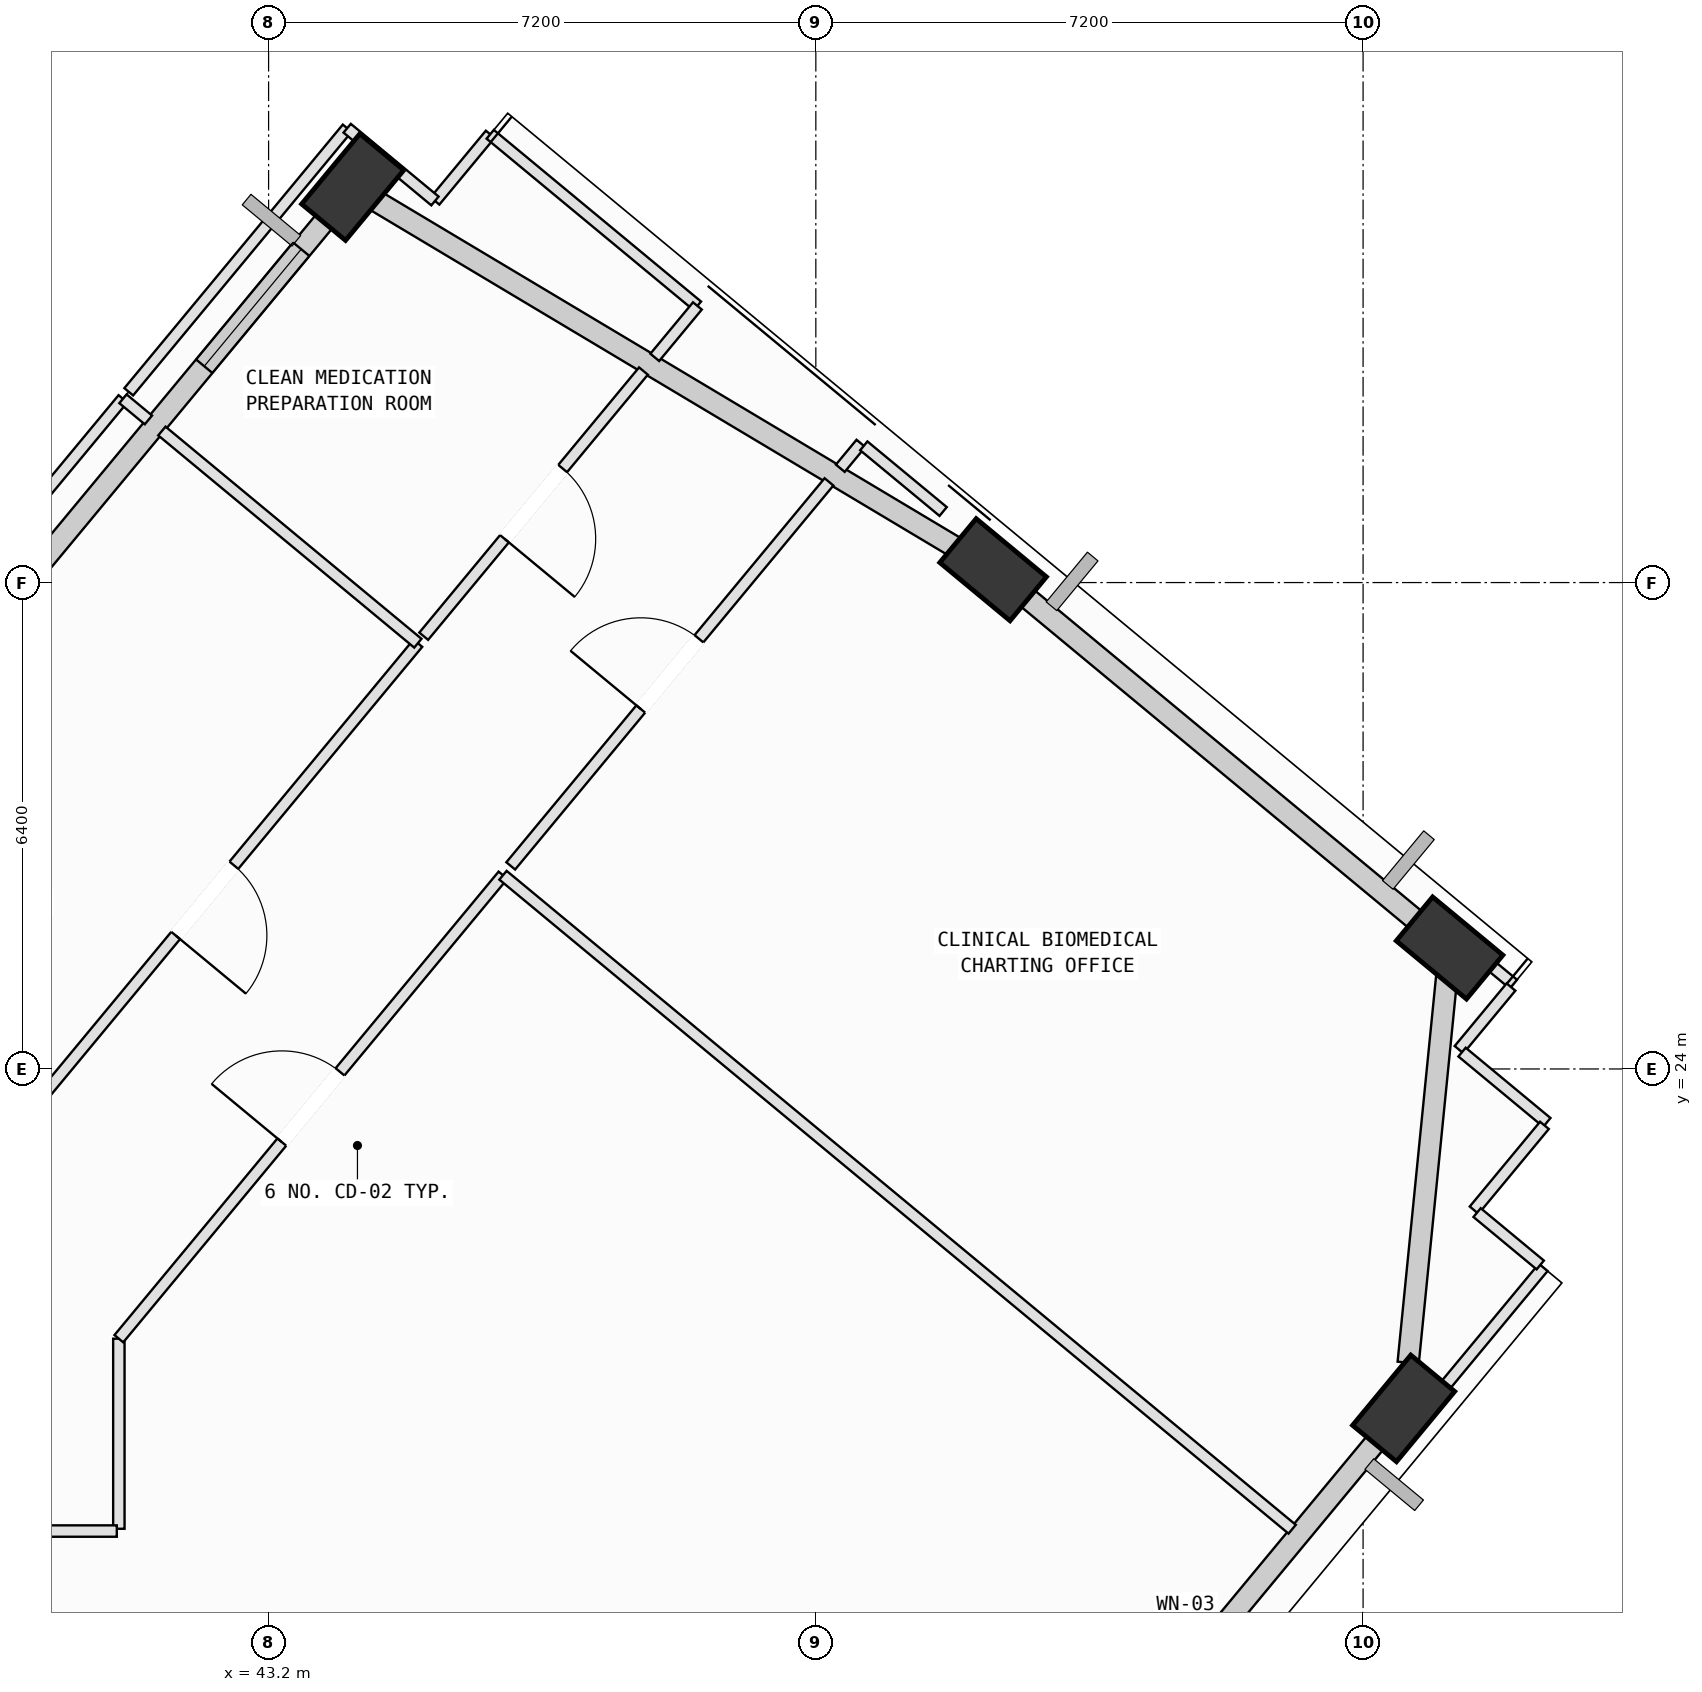
"""IFC4 building model, lengths in metres.
Left out: names, types, materials, properties, quantities, classifications, styles, units other than length and angle.
Written with IfcOpenShell. Run it as: python <this file> out.ifc"""

import sys

from ifc_helpers import new_model, si_unit, direction, frame, frame_2d, origin, origin_2d, place, context, subcontext, project, spatial, rectangle, extrude, element, fill, save


model = new_model("IFC4")
c1 = context("Model", 3, precision=1e-05, world=origin(), true_north=direction((0.0, 1.0)))
c2 = subcontext(c1, "Body", "Model", "MODEL_VIEW")
j1 = project(units=[si_unit("LENGTHUNIT", "METRE"), si_unit("PLANEANGLEUNIT", "RADIAN")], contexts=[c1])
p1 = place(None, origin())
s1 = spatial("IfcSite", under=j1, at=p1, CompositionType="ELEMENT")
p2 = place(p1, origin())
s2 = spatial("IfcBuilding", under=s1, at=p2, CompositionType="ELEMENT")
p3 = place(p2, frame((0.0, 0.0, 239.2)))
s3 = spatial("IfcBuildingStorey", under=s2, at=p3, CompositionType="ELEMENT", Elevation=239.2)
p4 = place(p3, frame((58.134, 19.534, 0.002), z_axis=(0.020841764448, 0.101352953642, 0.994632193146), x_axis=(-0.779271158589, -0.621602053987, 0.079670244575)))
e1 = element("IfcColumn", 1, at=p4, inside=s3, PredefinedType="COLUMN", context=c2, shape_type="SweptSolid", body=[
    extrude(rectangle(XDim=1.2, YDim=0.75, at=origin_2d()), origin(), (0.0, 0.0, 1.0), 4.018),
])
p5 = place(p3, frame((58.738, 25.592, 0.002), z_axis=(-0.00413180517, 0.103598938464, 0.994610571096), x_axis=(0.794636797122, -0.60346946511, 0.066158637682)))
e2 = element("IfcColumn", 2, at=p5, inside=s3, PredefinedType="COLUMN", context=c2, shape_type="SweptSolid", body=[
    extrude(rectangle(XDim=1.2, YDim=0.75, at=origin_2d()), origin(), (0.0, 0.0, 1.0), 4.018),
])
p6 = place(p3, frame((52.732, 30.569, 0.002), z_axis=(-0.024474787639, 0.07884291043, 0.996586564351), x_axis=(0.923871255264, -0.379060645823, 0.052677608953)))
e3 = element("IfcColumn", 3, at=p6, inside=s3, PredefinedType="COLUMN", context=c2, shape_type="SweptSolid", body=[
    extrude(rectangle(XDim=1.2, YDim=0.75, at=origin_2d()), origin(), (0.0, 0.0, 1.0), 4.01),
])
p7 = place(p3, frame((44.306, 35.604, 0.002), z_axis=(-0.045056898125, 0.043898466373, 0.99801943898), x_axis=(0.105104119877, -0.993281009767, 0.048435107314)))
e4 = element("IfcColumn", 4, at=p7, inside=s3, PredefinedType="COLUMN", context=c2, shape_type="SweptSolid", body=[
    extrude(rectangle(XDim=1.2, YDim=0.75, at=origin_2d()), origin(), (0.0, 0.0, 1.0), 4.004),
])
p8 = place(p3, frame((58.005, 19.379, 0.0), z_axis=(0.0, 0.0, 1.0), x_axis=(-0.638068125054, -0.769979913888, 0.0)))
e5 = element("IfcWall", 5, at=p8, inside=s3, PredefinedType="SOLIDWALL", context=c2, shape_type="SweptSolid", body=[
    extrude(rectangle(XDim=6.418, YDim=0.28, at=frame_2d((3.209, 0.0))), origin(), (0.0, 0.0, 1.0), 3.265),
])
p9 = place(p8, frame((3.593, 0.0, 0.75)))
e6 = element("IfcOpeningElement", 6, at=p9, cuts=e5, PredefinedType="OPENING", context=c2, shape_type="SweptSolid", body=[
    extrude(rectangle(XDim=1.4, YDim=1.85, at=frame_2d((0.7, 0.925))), frame((0.0, 0.15, 0.0), z_axis=(0.0, -1.0, 0.0), x_axis=(1.0, 0.0, 0.0)), (0.0, 0.0, 1.0), 0.3),
])
p10 = place(p3, frame((58.719, 25.403, 0.0), z_axis=(0.0, 0.0, 1.0), x_axis=(-0.099289114545, -0.995058627284, 0.0)))
e7 = element("IfcWall", 7, at=p10, inside=s3, PredefinedType="SOLIDWALL", context=c2, shape_type="SweptSolid", body=[
    extrude(rectangle(XDim=5.294, YDim=0.28, at=frame_2d((2.647, 0.0))), origin(), (0.0, 0.0, 1.0), 3.265),
])
p11 = place(p3, frame((52.924, 30.41, 0.0), z_axis=(0.0, 0.0, 1.0), x_axis=(0.769945199244, -0.638110014152, 0.0)))
e8 = element("IfcWall", 8, at=p11, inside=s3, PredefinedType="SOLIDWALL", context=c2, shape_type="SweptSolid", body=[
    extrude(rectangle(XDim=7.046, YDim=0.28, at=frame_2d((3.523, 0.0))), origin(), (0.0, 0.0, 1.0), 3.265),
])
p12 = place(p3, frame((44.542, 35.463, 0.0), z_axis=(0.0, 0.0, 1.0), x_axis=(0.858430756312, -0.512929465539, 0.0)))
e9 = element("IfcWall", 9, at=p12, inside=s3, PredefinedType="SOLIDWALL", context=c2, shape_type="SweptSolid", body=[
    extrude(rectangle(XDim=9.036, YDim=0.28, at=frame_2d((4.518, 0.0))), origin(), (0.0, 0.0, 1.0), 3.265),
])
p13 = place(p3, frame((39.746, 30.101, 0.0), z_axis=(0.0, 0.0, 1.0), x_axis=(0.638113633716, 0.769942199431, 0.0)))
e10 = element("IfcWall", 10, at=p13, inside=s3, PredefinedType="SOLIDWALL", context=c2, shape_type="SweptSolid", body=[
    extrude(rectangle(XDim=6.78, YDim=0.28, at=frame_2d((3.39, 0.0))), origin(), (0.0, 0.0, 1.0), 3.265),
])
p14 = place(p13, frame((4.086, 0.0, 0.75)))
e11 = element("IfcOpeningElement", 11, at=p14, cuts=e10, PredefinedType="OPENING", context=c2, shape_type="SweptSolid", body=[
    extrude(rectangle(XDim=2.0, YDim=1.95, at=frame_2d((1.0, 0.975))), frame((0.0, 0.15, 0.0), z_axis=(0.0, -1.0, 0.0), x_axis=(1.0, 0.0, 0.0)), (0.0, 0.0, 1.0), 0.3),
])
p15 = place(p3, frame((41.23, 17.95, 0.0), z_axis=(0.0, 0.0, 1.0), x_axis=(0.0, 1.0, 0.0)))
e12 = element("IfcWall", 12, at=p15, inside=s3, PredefinedType="PARTITIONING", context=c2, shape_type="SweptSolid", body=[
    extrude(rectangle(XDim=2.501, YDim=0.15, at=frame_2d((1.25, 0.0))), origin(), (0.0, 0.0, 1.0), 3.78),
])
p16 = place(p3, frame((41.23, 20.451, 0.0), z_axis=(0.0, 0.0, 1.0), x_axis=(0.638108201762, 0.769946701301, 0.0)))
e13 = element("IfcWall", 13, at=p16, inside=s3, PredefinedType="PARTITIONING", context=c2, shape_type="SweptSolid", body=[
    extrude(rectangle(XDim=7.92, YDim=0.15, at=frame_2d((3.96, 0.0))), origin(), (0.0, 0.0, 1.0), 3.78),
])
p17 = place(p16, frame((3.36, 0.0, 0.0)))
e14 = element("IfcOpeningElement", 14, at=p17, cuts=e13, PredefinedType="OPENING", context=c2, shape_type="SweptSolid", body=[
    extrude(rectangle(XDim=1.2, YDim=2.15, at=frame_2d((0.6, 1.075))), frame((0.0, 0.085, 0.0), z_axis=(0.0, -1.0, 0.0), x_axis=(1.0, 0.0, 0.0)), (0.0, 0.0, 1.0), 0.17),
])
p18 = place(p3, frame((46.284, 26.549, 0.0), z_axis=(0.0, 0.0, 1.0), x_axis=(0.769953196948, -0.638100363978, 0.0)))
e15 = element("IfcWall", 15, at=p18, inside=s3, PredefinedType="PARTITIONING", context=c2, shape_type="SweptSolid", body=[
    extrude(rectangle(XDim=13.485, YDim=0.15, at=frame_2d((6.743, 0.0))), origin(), (0.0, 0.0, 1.0), 3.78),
])
p19 = place(p3, frame((39.133, 17.92, 0.0), z_axis=(0.0, 0.0, 1.0), x_axis=(1.0, 0.0, 0.0)))
e16 = element("IfcWall", 16, at=p19, inside=s3, PredefinedType="PARTITIONING", context=c2, shape_type="SweptSolid", body=[
    extrude(rectangle(XDim=2.07, YDim=0.15, at=frame_2d((1.035, 0.0))), origin(), (0.0, 0.0, 1.0), 3.165),
])
p20 = place(p3, frame((59.97, 21.389, 0.0), z_axis=(0.0, 0.0, 1.0), x_axis=(-0.638202372538, -0.769868645736, 0.0)))
e17 = element("IfcWall", 17, at=p20, inside=s3, PredefinedType="PARTITIONING", context=c2, shape_type="SweptSolid", body=[
    extrude(rectangle(XDim=2.802, YDim=0.15, at=frame_2d((1.401, 0.0))), origin(), (0.0, 0.0, 1.0), 3.265),
])
p21 = place(p3, frame((46.386, 26.672, 0.0), z_axis=(0.0, 0.0, 1.0), x_axis=(0.638041184216, 0.770002238467, 0.0)))
e18 = element("IfcWall", 18, at=p21, inside=s3, PredefinedType="PARTITIONING", context=c2, shape_type="SweptSolid", body=[
    extrude(rectangle(XDim=6.562, YDim=0.15, at=frame_2d((3.281, 0.0))), origin(), (0.0, 0.0, 1.0), 3.78),
])
p22 = place(p21, frame((2.681, 0.0, 0.0)))
e19 = element("IfcOpeningElement", 19, at=p22, cuts=e18, PredefinedType="OPENING", context=c2, shape_type="SweptSolid", body=[
    extrude(rectangle(XDim=1.2, YDim=2.15, at=frame_2d((0.6, 1.075))), frame((0.0, 0.085, 0.0), z_axis=(0.0, -1.0, 0.0), x_axis=(1.0, 0.0, 0.0)), (0.0, 0.0, 1.0), 0.17),
])
p23 = place(p3, frame((50.722, 31.904, 0.0), z_axis=(0.0, 0.0, 1.0), x_axis=(0.638202912534, 0.769868198092, 0.0)))
e20 = element("IfcWall", 20, at=p23, inside=s3, PredefinedType="PARTITIONING", context=c2, shape_type="SweptSolid", body=[
    extrude(rectangle(XDim=0.425, YDim=0.15, at=frame_2d((0.212, 0.0))), origin(), (0.0, 0.0, 1.0), 3.78),
])
p24 = place(p3, frame((51.031, 32.199, 0.0), z_axis=(0.0, 0.0, 1.0), x_axis=(0.770372960618, -0.637593523767, 0.0)))
e21 = element("IfcWall", 21, at=p24, inside=s3, PredefinedType="PARTITIONING", context=c2, shape_type="SweptSolid", body=[
    extrude(rectangle(XDim=1.355, YDim=0.15, at=frame_2d((0.678, 0.0))), origin(), (0.0, 0.0, 1.0), 3.265),
])
p25 = place(p3, frame((52.427, 31.043, 0.0), z_axis=(0.0, 0.0, 1.0), x_axis=(0.769594165674, -0.6385333352, 0.0)))
e22 = element("IfcWall", 22, at=p25, inside=s3, PredefinedType="PARTITIONING", context=c2, shape_type="SweptSolid", body=[
    extrude(rectangle(XDim=0.786, YDim=0.15, at=frame_2d((0.393, 0.0))), origin(), (0.0, 0.0, 1.0), 3.265),
])
p26 = place(p3, frame((58.457, 26.045, 0.0), z_axis=(0.0, 0.0, 1.0), x_axis=(0.769936808354, -0.638120138486, 0.0)))
e23 = element("IfcWall", 23, at=p26, inside=s3, PredefinedType="PARTITIONING", context=c2, shape_type="SweptSolid", body=[
    extrude(rectangle(XDim=1.456, YDim=0.15, at=frame_2d((0.728, 0.0))), origin(), (0.0, 0.0, 1.0), 3.265),
])
p27 = place(p3, frame((59.546, 25.078, 0.0), z_axis=(0.0, 0.0, 1.0), x_axis=(-0.638095158192, -0.769957511225, 0.0)))
e24 = element("IfcWall", 24, at=p27, inside=s3, PredefinedType="PARTITIONING", context=c2, shape_type="SweptSolid", body=[
    extrude(rectangle(XDim=1.07, YDim=0.15, at=frame_2d((0.535, 0.0))), origin(), (0.0, 0.0, 1.0), 3.78),
])
for number, where, z_axis, x_axis in (
    (25, (58.902, 24.222, 0.0), (0.0, 0.0, 1.0), (0.77, -0.638, 0.0)),
    (26, (59.986, 23.258, 0.0), (0.0, 0.0, 1.0), (-0.638, -0.77, 0.0)),
):
    element("IfcWall", number, at=place(p3, frame(where, z_axis=z_axis, x_axis=x_axis)), inside=s3, PredefinedType="PARTITIONING", context=c2, shape_type="SweptSolid", body=[
        extrude(rectangle(XDim=1.449, YDim=0.15, at=frame_2d((0.725, 0.0))), origin(), (0.0, 0.0, 1.0), 3.78),
    ])
p28 = place(p3, frame((59.1, 22.11, 0.0), z_axis=(0.0, 0.0, 1.0), x_axis=(0.769646818305, -0.638469870137, 0.0)))
e27 = element("IfcWall", 27, at=p28, inside=s3, PredefinedType="PARTITIONING", context=c2, shape_type="SweptSolid", body=[
    extrude(rectangle(XDim=1.08, YDim=0.15, at=frame_2d((0.54, 0.0))), origin(), (0.0, 0.0, 1.0), 3.78),
])
p29 = place(p3, frame((45.164, 29.602, 0.0), z_axis=(0.0, 0.0, 1.0), x_axis=(-0.638028689029, -0.770012592089, 0.0)))
e28 = element("IfcWall", 28, at=p29, inside=s3, PredefinedType="PARTITIONING", context=c2, shape_type="SweptSolid", body=[
    extrude(rectangle(XDim=8.788, YDim=0.15, at=frame_2d((4.394, 0.0))), origin(), (0.0, 0.0, 1.0), 3.78),
])
p30 = place(p29, frame((3.794, 0.0, 0.0)))
e29 = element("IfcOpeningElement", 29, at=p30, cuts=e28, PredefinedType="OPENING", context=c2, shape_type="SweptSolid", body=[
    extrude(rectangle(XDim=1.2, YDim=2.15, at=frame_2d((0.6, 1.075))), frame((0.0, 0.085, 0.0), z_axis=(0.0, -1.0, 0.0), x_axis=(1.0, 0.0, 0.0)), (0.0, 0.0, 1.0), 0.17),
])
p31 = place(p3, frame((35.676, 26.051, 0.0), z_axis=(0.0, 0.0, 1.0), x_axis=(0.638078099411, 0.769971648213, 0.0)))
e30 = element("IfcWall", 30, at=p31, inside=s3, PredefinedType="PARTITIONING", context=c2, shape_type="SweptSolid", body=[
    extrude(rectangle(XDim=8.789, YDim=0.15, at=frame_2d((4.395, 0.0))), origin(), (0.0, 0.0, 1.0), 3.265),
])
p32 = place(p3, frame((41.284, 32.818, 0.0), z_axis=(0.0, 0.0, 1.0), x_axis=(0.76941508452, -0.638749111712, 0.0)))
e31 = element("IfcWall", 31, at=p32, inside=s3, PredefinedType="PARTITIONING", context=c2, shape_type="SweptSolid", body=[
    extrude(rectangle(XDim=0.435, YDim=0.15, at=frame_2d((0.218, 0.0))), origin(), (0.0, 0.0, 1.0), 3.78),
])
p33 = place(p3, frame((41.796, 32.394, 0.0), z_axis=(0.0, 0.0, 1.0), x_axis=(0.769883678484, -0.638184237978, 0.0)))
e32 = element("IfcWall", 32, at=p33, inside=s3, PredefinedType="PARTITIONING", context=c2, shape_type="SweptSolid", body=[
    extrude(rectangle(XDim=4.375, YDim=0.15, at=frame_2d((2.188, 0.0))), origin(), (0.0, 0.0, 1.0), 3.78),
])
p34 = place(p3, frame((45.389, 35.421, 0.0), z_axis=(0.0, 0.0, 1.0), x_axis=(0.638137652761, 0.769922292267, 0.0)))
e33 = element("IfcWall", 33, at=p34, inside=s3, PredefinedType="PARTITIONING", context=c2, shape_type="SweptSolid", body=[
    extrude(rectangle(XDim=1.139, YDim=0.15, at=frame_2d((0.57, 0.0))), origin(), (0.0, 0.0, 1.0), 3.78),
])
p35 = place(p3, frame((46.116, 36.298, 0.0), z_axis=(0.0, 0.0, 1.0), x_axis=(0.770117395611, -0.63790218449, 0.0)))
e34 = element("IfcWall", 34, at=p35, inside=s3, PredefinedType="PARTITIONING", context=c2, shape_type="SweptSolid", body=[
    extrude(rectangle(XDim=3.54, YDim=0.15, at=frame_2d((1.77, 0.0))), origin(), (0.0, 0.0, 1.0), 3.78),
])
p36 = place(p3, frame((48.842, 34.04, 0.0), z_axis=(0.0, 0.0, 1.0), x_axis=(-0.638079014013, -0.769970890278, 0.0)))
e35 = element("IfcWall", 35, at=p36, inside=s3, PredefinedType="PARTITIONING", context=c2, shape_type="SweptSolid", body=[
    extrude(rectangle(XDim=0.879, YDim=0.15, at=frame_2d((0.439, 0.0))), origin(), (0.0, 0.0, 1.0), 3.78),
])
p37 = place(p3, frame((48.132, 33.183, 0.0), z_axis=(0.0, 0.0, 1.0), x_axis=(-0.638046160412, -0.769998115052, 0.0)))
e36 = element("IfcWall", 36, at=p37, inside=s3, PredefinedType="PARTITIONING", context=c2, shape_type="SweptSolid", body=[
    extrude(rectangle(XDim=4.531, YDim=0.15, at=frame_2d((2.266, 0.0))), origin(), (0.0, 0.0, 1.0), 3.78),
])
p38 = place(p37, frame((1.666, 0.0, 0.0)))
e37 = element("IfcOpeningElement", 37, at=p38, cuts=e36, PredefinedType="OPENING", context=c2, shape_type="SweptSolid", body=[
    extrude(rectangle(XDim=1.2, YDim=2.15, at=frame_2d((0.6, 1.075))), frame((0.0, 0.085, 0.0), z_axis=(0.0, -1.0, 0.0), x_axis=(1.0, 0.0, 0.0)), (0.0, 0.0, 1.0), 0.17),
])
p39 = place(p3, frame((41.36, 32.91, 0.0), z_axis=(0.0, 0.0, 1.0), x_axis=(0.638054595823, 0.76999112511, 0.0)))
e38 = element("IfcWall", 38, at=p39, inside=s3, PredefinedType="PARTITIONING", context=c2, shape_type="SweptSolid", body=[
    extrude(rectangle(XDim=4.504, YDim=0.15, at=frame_2d((2.252, 0.0))), origin(), (0.0, 0.0, 1.0), 3.265),
])
p40 = place(p3, frame((44.234, 36.378, 0.0), z_axis=(0.0, 0.0, 1.0), x_axis=(0.770019276268, -0.638020622061, 0.0)))
e39 = element("IfcWall", 39, at=p40, inside=s3, PredefinedType="PARTITIONING", context=c2, shape_type="SweptSolid", body=[
    extrude(rectangle(XDim=1.5, YDim=0.15, at=frame_2d((0.75, 0.0))), origin(), (0.0, 0.0, 1.0), 3.265),
])
p41 = place(p14, origin())
e40 = element("IfcWindow", 40, at=p41, inside=s3, PartitioningType="SINGLE_PANEL", PredefinedType="WINDOW", context=c2, shape_type="SweptSolid", body=[
    extrude(rectangle(XDim=2.0, YDim=1.95, at=frame_2d((1.0, 0.975))), frame((0.0, 0.03, 0.0), z_axis=(0.0, -1.0, 0.0), x_axis=(1.0, 0.0, 0.0)), (0.0, 0.0, 1.0), 0.06),
])
fill(e11, e40)
p42 = place(p17, origin())
e41 = element("IfcDoor", 41, at=p42, inside=s3, OperationType="SINGLE_SWING_LEFT", PredefinedType="DOOR", context=c2, shape_type="SweptSolid", body=[
    extrude(rectangle(XDim=1.2, YDim=2.15, at=frame_2d((0.6, 1.075))), frame((0.0, 0.025, 0.0), z_axis=(0.0, -1.0, 0.0), x_axis=(1.0, 0.0, 0.0)), (0.0, 0.0, 1.0), 0.05),
])
fill(e14, e41)
p43 = place(p22, origin())
e42 = element("IfcDoor", 42, at=p43, inside=s3, OperationType="SINGLE_SWING_LEFT", PredefinedType="DOOR", context=c2, shape_type="SweptSolid", body=[
    extrude(rectangle(XDim=1.2, YDim=2.15, at=frame_2d((0.6, 1.075))), frame((0.0, 0.025, 0.0), z_axis=(0.0, -1.0, 0.0), x_axis=(1.0, 0.0, 0.0)), (0.0, 0.0, 1.0), 0.05),
])
fill(e19, e42)
p44 = place(p30, origin())
e43 = element("IfcDoor", 43, at=p44, inside=s3, OperationType="SINGLE_SWING_RIGHT", PredefinedType="DOOR", context=c2, shape_type="SweptSolid", body=[
    extrude(rectangle(XDim=1.2, YDim=2.15, at=frame_2d((0.6, 1.075))), frame((0.0, 0.025, 0.0), z_axis=(0.0, -1.0, 0.0), x_axis=(1.0, 0.0, 0.0)), (0.0, 0.0, 1.0), 0.05),
])
fill(e29, e43)
p45 = place(p38, origin())
e44 = element("IfcDoor", 44, at=p45, inside=s3, OperationType="SINGLE_SWING_RIGHT", PredefinedType="DOOR", context=c2, shape_type="SweptSolid", body=[
    extrude(rectangle(XDim=1.2, YDim=2.15, at=frame_2d((0.6, 1.075))), frame((0.0, 0.025, 0.0), z_axis=(0.0, -1.0, 0.0), x_axis=(1.0, 0.0, 0.0)), (0.0, 0.0, 1.0), 0.05),
])
fill(e37, e44)
save(model, sys.argv[1])
